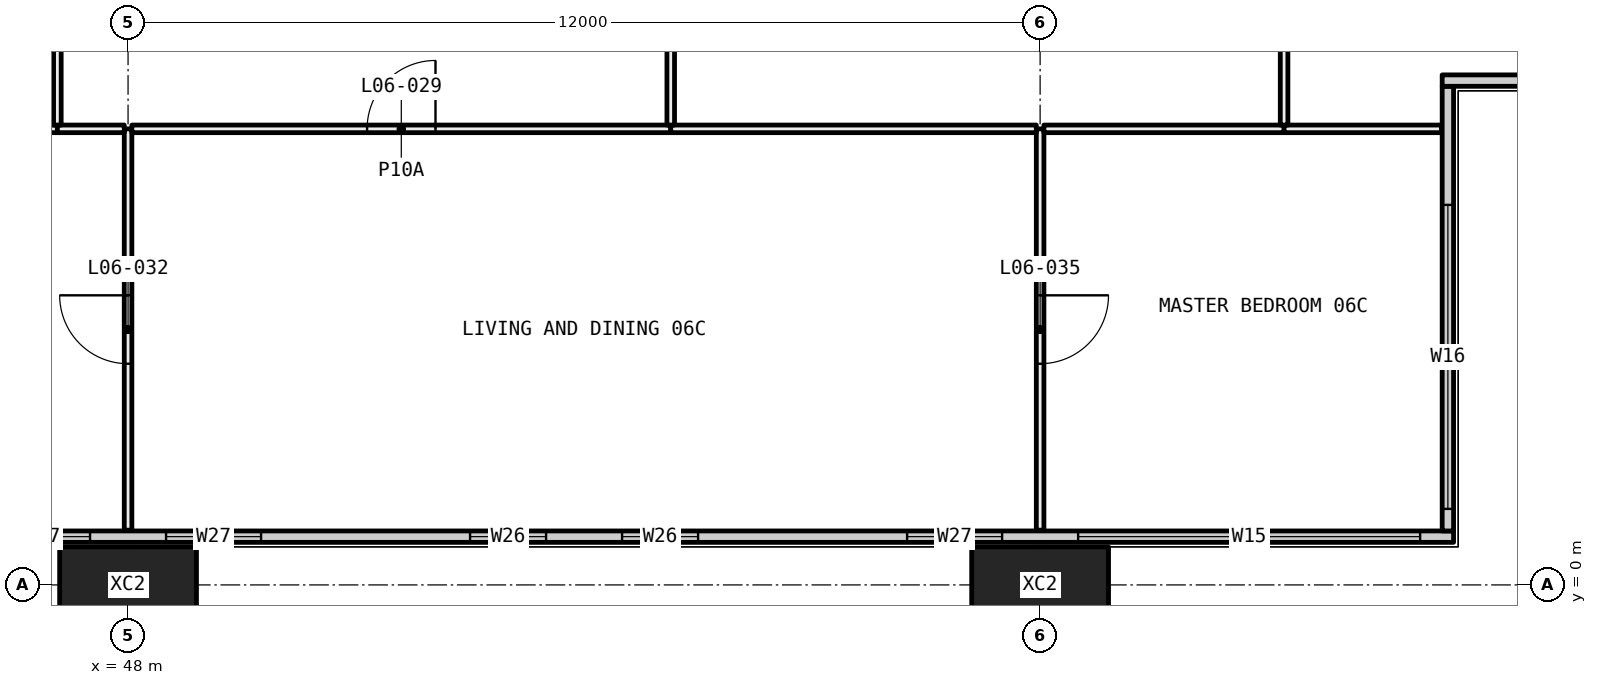
"""IFC4 building model, lengths in metres.
Left out: names, types, materials, properties, quantities, classifications, styles, units other than length and angle.
Written with IfcOpenShell. Run it as: python <this file> out.ifc"""

import sys

from ifc_helpers import new_model, si_unit, direction, frame, frame_2d, origin, origin_2d, place, context, subcontext, project, spatial, rectangle, hollow_rectangle, extrude, element, fill, save


model = new_model("IFC4")
c1 = context("Model", 3, precision=1e-05, world=origin(), true_north=direction((0.0, 1.0)))
c2 = subcontext(c1, "Body", "Model", "MODEL_VIEW")
j1 = project(units=[si_unit("LENGTHUNIT", "METRE"), si_unit("PLANEANGLEUNIT", "RADIAN")], contexts=[c1])
p1 = place(None, origin())
s1 = spatial("IfcSite", under=j1, at=p1, CompositionType="ELEMENT")
p2 = place(p1, origin())
s2 = spatial("IfcBuilding", under=s1, at=p2, CompositionType="ELEMENT")
p3 = place(p2, frame((0.0, 0.0, 33.45)))
s3 = spatial("IfcBuildingStorey", under=s2, at=p3, CompositionType="ELEMENT", Elevation=33.45)
for number, where, z_axis, x_axis in (
    (1, (48.0, 0.0, -0.4), (0.0, 0.0, 1.0), (1.0, 0.0, 0.0)),
    (2, (60.0, 0.0, -0.4), (0.0, 0.0, 1.0), (1.0, 0.0, 0.0)),
):
    element("IfcColumn", number, at=place(p3, frame(where, z_axis=z_axis, x_axis=x_axis)), inside=s3, PredefinedType="COLUMN", context=c2, shape_type="SweptSolid", body=[
        extrude(hollow_rectangle(XDim=1.8, YDim=1.0, WallThickness=0.07, at=origin_2d()), origin(), (0.0, 0.0, 1.0), 3.45),
    ])
p4 = place(p3, frame((6.56, 0.635, 0.0), z_axis=(0.0, 0.0, 1.0), x_axis=(1.0, 0.0, 0.0)))
e3 = element("IfcWall", 3, at=p4, inside=s3, PredefinedType="ELEMENTEDWALL", context=c2, shape_type="SweptSolid", body=[
    extrude(rectangle(XDim=58.88, YDim=0.15, at=frame_2d((29.44, 0.0))), origin(), (0.0, 0.0, 1.0), 3.05),
])
p5 = place(p4, frame((0.44, 0.0, 0.45)))
e4 = element("IfcOpeningElement", 4, at=p5, cuts=e3, PredefinedType="OPENING", context=c2, shape_type="SweptSolid", body=[
    extrude(rectangle(XDim=4.5, YDim=2.55, at=frame_2d((2.25, 1.275))), frame((0.0, 0.085, 0.0), z_axis=(0.0, -1.0, 0.0), x_axis=(1.0, 0.0, 0.0)), (0.0, 0.0, 1.0), 0.17),
])
p6 = place(p4, frame((5.94, 0.0, 0.45)))
e5 = element("IfcOpeningElement", 5, at=p6, cuts=e3, PredefinedType="OPENING", context=c2, shape_type="SweptSolid", body=[
    extrude(rectangle(XDim=1.25, YDim=2.55, at=frame_2d((0.625, 1.275))), frame((0.0, 0.085, 0.0), z_axis=(0.0, -1.0, 0.0), x_axis=(1.0, 0.0, 0.0)), (0.0, 0.0, 1.0), 0.17),
])
p7 = place(p4, frame((9.94, 0.0, 0.45)))
e6 = element("IfcOpeningElement", 6, at=p7, cuts=e3, PredefinedType="OPENING", context=c2, shape_type="SweptSolid", body=[
    extrude(rectangle(XDim=1.0, YDim=2.55, at=frame_2d((0.5, 1.275))), frame((0.0, 0.085, 0.0), z_axis=(0.0, -1.0, 0.0), x_axis=(1.0, 0.0, 0.0)), (0.0, 0.0, 1.0), 0.17),
])
p8 = place(p4, frame((11.94, 0.0, 0.45)))
e7 = element("IfcOpeningElement", 7, at=p8, cuts=e3, PredefinedType="OPENING", context=c2, shape_type="SweptSolid", body=[
    extrude(rectangle(XDim=1.0, YDim=2.55, at=frame_2d((0.5, 1.275))), frame((0.0, 0.085, 0.0), z_axis=(0.0, -1.0, 0.0), x_axis=(1.0, 0.0, 0.0)), (0.0, 0.0, 1.0), 0.17),
])
p9 = place(p4, frame((15.69, 0.0, 0.45)))
e8 = element("IfcOpeningElement", 8, at=p9, cuts=e3, PredefinedType="OPENING", context=c2, shape_type="SweptSolid", body=[
    extrude(rectangle(XDim=1.25, YDim=2.55, at=frame_2d((0.625, 1.275))), frame((0.0, 0.085, 0.0), z_axis=(0.0, -1.0, 0.0), x_axis=(1.0, 0.0, 0.0)), (0.0, 0.0, 1.0), 0.17),
])
p10 = place(p4, frame((17.94, 0.0, 0.45)))
e9 = element("IfcOpeningElement", 9, at=p10, cuts=e3, PredefinedType="OPENING", context=c2, shape_type="SweptSolid", body=[
    extrude(rectangle(XDim=1.25, YDim=2.55, at=frame_2d((0.625, 1.275))), frame((0.0, 0.085, 0.0), z_axis=(0.0, -1.0, 0.0), x_axis=(1.0, 0.0, 0.0)), (0.0, 0.0, 1.0), 0.17),
])
p11 = place(p4, frame((21.94, 0.0, 0.45)))
e10 = element("IfcOpeningElement", 10, at=p11, cuts=e3, PredefinedType="OPENING", context=c2, shape_type="SweptSolid", body=[
    extrude(rectangle(XDim=1.0, YDim=2.55, at=frame_2d((0.5, 1.275))), frame((0.0, 0.085, 0.0), z_axis=(0.0, -1.0, 0.0), x_axis=(1.0, 0.0, 0.0)), (0.0, 0.0, 1.0), 0.17),
])
p12 = place(p4, frame((23.94, 0.0, 0.45)))
e11 = element("IfcOpeningElement", 11, at=p12, cuts=e3, PredefinedType="OPENING", context=c2, shape_type="SweptSolid", body=[
    extrude(rectangle(XDim=1.0, YDim=2.55, at=frame_2d((0.5, 1.275))), frame((0.0, 0.085, 0.0), z_axis=(0.0, -1.0, 0.0), x_axis=(1.0, 0.0, 0.0)), (0.0, 0.0, 1.0), 0.17),
])
p13 = place(p4, frame((27.69, 0.0, 0.45)))
e12 = element("IfcOpeningElement", 12, at=p13, cuts=e3, PredefinedType="OPENING", context=c2, shape_type="SweptSolid", body=[
    extrude(rectangle(XDim=1.25, YDim=2.55, at=frame_2d((0.625, 1.275))), frame((0.0, 0.085, 0.0), z_axis=(0.0, -1.0, 0.0), x_axis=(1.0, 0.0, 0.0)), (0.0, 0.0, 1.0), 0.17),
])
p14 = place(p4, frame((29.94, 0.0, 0.45)))
e13 = element("IfcOpeningElement", 13, at=p14, cuts=e3, PredefinedType="OPENING", context=c2, shape_type="SweptSolid", body=[
    extrude(rectangle(XDim=1.25, YDim=2.55, at=frame_2d((0.625, 1.275))), frame((0.0, 0.085, 0.0), z_axis=(0.0, -1.0, 0.0), x_axis=(1.0, 0.0, 0.0)), (0.0, 0.0, 1.0), 0.17),
])
p15 = place(p4, frame((33.94, 0.0, 0.45)))
e14 = element("IfcOpeningElement", 14, at=p15, cuts=e3, PredefinedType="OPENING", context=c2, shape_type="SweptSolid", body=[
    extrude(rectangle(XDim=1.0, YDim=2.55, at=frame_2d((0.5, 1.275))), frame((0.0, 0.085, 0.0), z_axis=(0.0, -1.0, 0.0), x_axis=(1.0, 0.0, 0.0)), (0.0, 0.0, 1.0), 0.17),
])
p16 = place(p4, frame((35.94, 0.0, 0.45)))
e15 = element("IfcOpeningElement", 15, at=p16, cuts=e3, PredefinedType="OPENING", context=c2, shape_type="SweptSolid", body=[
    extrude(rectangle(XDim=1.0, YDim=2.55, at=frame_2d((0.5, 1.275))), frame((0.0, 0.085, 0.0), z_axis=(0.0, -1.0, 0.0), x_axis=(1.0, 0.0, 0.0)), (0.0, 0.0, 1.0), 0.17),
])
p17 = place(p4, frame((39.69, 0.0, 0.45)))
e16 = element("IfcOpeningElement", 16, at=p17, cuts=e3, PredefinedType="OPENING", context=c2, shape_type="SweptSolid", body=[
    extrude(rectangle(XDim=1.25, YDim=2.55, at=frame_2d((0.625, 1.275))), frame((0.0, 0.085, 0.0), z_axis=(0.0, -1.0, 0.0), x_axis=(1.0, 0.0, 0.0)), (0.0, 0.0, 1.0), 0.17),
])
p18 = place(p4, frame((41.94, 0.0, 0.45)))
e17 = element("IfcOpeningElement", 17, at=p18, cuts=e3, PredefinedType="OPENING", context=c2, shape_type="SweptSolid", body=[
    extrude(rectangle(XDim=1.25, YDim=2.55, at=frame_2d((0.625, 1.275))), frame((0.0, 0.085, 0.0), z_axis=(0.0, -1.0, 0.0), x_axis=(1.0, 0.0, 0.0)), (0.0, 0.0, 1.0), 0.17),
])
p19 = place(p4, frame((45.94, 0.0, 0.45)))
e18 = element("IfcOpeningElement", 18, at=p19, cuts=e3, PredefinedType="OPENING", context=c2, shape_type="SweptSolid", body=[
    extrude(rectangle(XDim=1.0, YDim=2.55, at=frame_2d((0.5, 1.275))), frame((0.0, 0.085, 0.0), z_axis=(0.0, -1.0, 0.0), x_axis=(1.0, 0.0, 0.0)), (0.0, 0.0, 1.0), 0.17),
])
p20 = place(p4, frame((47.94, 0.0, 0.45)))
e19 = element("IfcOpeningElement", 19, at=p20, cuts=e3, PredefinedType="OPENING", context=c2, shape_type="SweptSolid", body=[
    extrude(rectangle(XDim=1.0, YDim=2.55, at=frame_2d((0.5, 1.275))), frame((0.0, 0.085, 0.0), z_axis=(0.0, -1.0, 0.0), x_axis=(1.0, 0.0, 0.0)), (0.0, 0.0, 1.0), 0.17),
])
p21 = place(p4, frame((51.69, 0.0, 0.45)))
e20 = element("IfcOpeningElement", 20, at=p21, cuts=e3, PredefinedType="OPENING", context=c2, shape_type="SweptSolid", body=[
    extrude(rectangle(XDim=1.25, YDim=2.55, at=frame_2d((0.625, 1.275))), frame((0.0, 0.085, 0.0), z_axis=(0.0, -1.0, 0.0), x_axis=(1.0, 0.0, 0.0)), (0.0, 0.0, 1.0), 0.17),
])
p22 = place(p4, frame((53.94, 0.0, 0.45)))
e21 = element("IfcOpeningElement", 21, at=p22, cuts=e3, PredefinedType="OPENING", context=c2, shape_type="SweptSolid", body=[
    extrude(rectangle(XDim=4.5, YDim=2.55, at=frame_2d((2.25, 1.275))), frame((0.0, 0.085, 0.0), z_axis=(0.0, -1.0, 0.0), x_axis=(1.0, 0.0, 0.0)), (0.0, 0.0, 1.0), 0.17),
])
p23 = place(p3, frame((65.365, 0.71, 0.0), z_axis=(0.0, 0.0, 1.0), x_axis=(0.0, 1.0, 0.0)))
e22 = element("IfcWall", 22, at=p23, inside=s3, PredefinedType="ELEMENTEDWALL", context=c2, shape_type="SweptSolid", body=[
    extrude(rectangle(XDim=5.85, YDim=0.15, at=frame_2d((2.925, 0.0))), origin(), (0.0, 0.0, 1.0), 3.05),
])
p24 = place(p23, frame((0.29, 0.0, 0.45)))
e23 = element("IfcOpeningElement", 23, at=p24, cuts=e22, PredefinedType="OPENING", context=c2, shape_type="SweptSolid", body=[
    extrude(rectangle(XDim=4.0, YDim=2.55, at=frame_2d((2.0, 1.275))), frame((0.0, 0.085, 0.0), z_axis=(0.0, -1.0, 0.0), x_axis=(1.0, 0.0, 0.0)), (0.0, 0.0, 1.0), 0.17),
])
p25 = place(p3, frame((65.29, 6.635, 0.0), z_axis=(0.0, 0.0, 1.0), x_axis=(1.0, 0.0, 0.0)))
e24 = element("IfcWall", 24, at=p25, inside=s3, PredefinedType="ELEMENTEDWALL", context=c2, shape_type="SweptSolid", body=[
    extrude(rectangle(XDim=6.15, YDim=0.15, at=frame_2d((3.075, 0.0))), origin(), (0.0, 0.0, 1.0), 3.05),
])
p26 = place(p25, frame((1.71, 0.0, 0.45)))
e25 = element("IfcOpeningElement", 25, at=p26, cuts=e24, PredefinedType="OPENING", context=c2, shape_type="SweptSolid", body=[
    extrude(rectangle(XDim=4.0, YDim=2.55, at=frame_2d((2.0, 1.275))), frame((0.0, 0.085, 0.0), z_axis=(0.0, -1.0, 0.0), x_axis=(1.0, 0.0, 0.0)), (0.0, 0.0, 1.0), 0.17),
])
p27 = place(p3, frame((48.0, 0.72, 0.0), z_axis=(0.0, 0.0, 1.0), x_axis=(0.0, 1.0, 0.0)))
e26 = element("IfcWall", 26, at=p27, inside=s3, PredefinedType="PARTITIONING", context=c2, shape_type="SweptSolid", body=[
    extrude(rectangle(XDim=5.28, YDim=0.1, at=frame_2d((2.64, 0.0))), origin(), (0.0, 0.0, 1.0), 2.45),
])
p28 = place(p27, frame((2.19, 0.0, 0.0)))
e27 = element("IfcOpeningElement", 27, at=p28, cuts=e26, PredefinedType="OPENING", context=c2, shape_type="SweptSolid", body=[
    extrude(rectangle(XDim=0.9, YDim=2.1, at=frame_2d((0.45, 1.05))), frame((0.0, 0.06, 0.0), z_axis=(0.0, -1.0, 0.0), x_axis=(1.0, 0.0, 0.0)), (0.0, 0.0, 1.0), 0.12),
])
p29 = place(p3, frame((47.07, 6.0, 0.0), z_axis=(0.0, 0.0, 1.0), x_axis=(-1.0, 0.0, 0.0)))
e28 = element("IfcWall", 28, at=p29, inside=s3, PredefinedType="PARTITIONING", context=c2, shape_type="SweptSolid", body=[
    extrude(rectangle(XDim=5.02, YDim=0.1, at=frame_2d((2.51, 0.0))), origin(), (0.0, 0.0, 1.0), 3.05),
])
p30 = place(p3, frame((47.95, 6.0, 0.0), z_axis=(0.0, 0.0, 1.0), x_axis=(-1.0, 0.0, 0.0)))
e29 = element("IfcWall", 29, at=p30, inside=s3, PredefinedType="PARTITIONING", context=c2, shape_type="SweptSolid", body=[
    extrude(rectangle(XDim=0.88, YDim=0.1, at=frame_2d((0.44, 0.0))), origin(), (0.0, 0.0, 1.0), 2.45),
])
p31 = place(p3, frame((60.0, 0.72, 0.0), z_axis=(0.0, 0.0, 1.0), x_axis=(0.0, 1.0, 0.0)))
e30 = element("IfcWall", 30, at=p31, inside=s3, PredefinedType="PARTITIONING", context=c2, shape_type="SweptSolid", body=[
    extrude(rectangle(XDim=5.28, YDim=0.1, at=frame_2d((2.64, 0.0))), origin(), (0.0, 0.0, 1.0), 2.45),
])
p32 = place(p31, frame((2.19, 0.0, 0.0)))
e31 = element("IfcOpeningElement", 31, at=p32, cuts=e30, PredefinedType="OPENING", context=c2, shape_type="SweptSolid", body=[
    extrude(rectangle(XDim=0.9, YDim=2.1, at=frame_2d((0.45, 1.05))), frame((0.0, 0.06, 0.0), z_axis=(0.0, -1.0, 0.0), x_axis=(1.0, 0.0, 0.0)), (0.0, 0.0, 1.0), 0.12),
])
p33 = place(p3, frame((55.14, 6.0, 0.0), z_axis=(0.0, 0.0, 1.0), x_axis=(-1.0, 0.0, 0.0)))
e32 = element("IfcWall", 32, at=p33, inside=s3, PredefinedType="PARTITIONING", context=c2, shape_type="SweptSolid", body=[
    extrude(rectangle(XDim=7.09, YDim=0.1, at=frame_2d((3.545, 0.0))), origin(), (0.0, 0.0, 1.0), 2.45),
])
p34 = place(p33, frame((3.095, 0.0, 0.0)))
e33 = element("IfcOpeningElement", 33, at=p34, cuts=e32, PredefinedType="OPENING", context=c2, shape_type="SweptSolid", body=[
    extrude(rectangle(XDim=0.9, YDim=2.1, at=frame_2d((0.45, 1.05))), frame((0.0, 0.06, 0.0), z_axis=(0.0, -1.0, 0.0), x_axis=(1.0, 0.0, 0.0)), (0.0, 0.0, 1.0), 0.12),
])
p35 = place(p3, frame((59.95, 6.0, 0.0), z_axis=(0.0, 0.0, 1.0), x_axis=(-1.0, 0.0, 0.0)))
e34 = element("IfcWall", 34, at=p35, inside=s3, PredefinedType="PARTITIONING", context=c2, shape_type="SweptSolid", body=[
    extrude(rectangle(XDim=4.81, YDim=0.1, at=frame_2d((2.405, 0.0))), origin(), (0.0, 0.0, 1.0), 2.45),
])
p36 = place(p3, frame((63.21, 6.0, 0.0), z_axis=(0.0, 0.0, 1.0), x_axis=(-1.0, 0.0, 0.0)))
e35 = element("IfcWall", 35, at=p36, inside=s3, PredefinedType="PARTITIONING", context=c2, shape_type="SweptSolid", body=[
    extrude(rectangle(XDim=3.16, YDim=0.1, at=frame_2d((1.58, 0.0))), origin(), (0.0, 0.0, 1.0), 2.45),
])
p37 = place(p3, frame((65.28, 6.0, 0.0), z_axis=(0.0, 0.0, 1.0), x_axis=(-1.0, 0.0, 0.0)))
e36 = element("IfcWall", 36, at=p37, inside=s3, PredefinedType="PARTITIONING", context=c2, shape_type="SweptSolid", body=[
    extrude(rectangle(XDim=2.07, YDim=0.1, at=frame_2d((1.035, 0.0))), origin(), (0.0, 0.0, 1.0), 3.05),
])
p38 = place(p3, frame((47.07, 6.05, 0.0), z_axis=(0.0, 0.0, 1.0), x_axis=(0.0, 1.0, 0.0)))
e37 = element("IfcWall", 37, at=p38, inside=s3, PredefinedType="PARTITIONING", context=c2, shape_type="SweptSolid", body=[
    extrude(rectangle(XDim=5.95, YDim=0.1, at=frame_2d((2.975, 0.0))), origin(), (0.0, 0.0, 1.0), 2.45),
])
p39 = place(p38, frame((2.525, 0.0, 0.0)))
e38 = element("IfcOpeningElement", 38, at=p39, cuts=e37, PredefinedType="OPENING", context=c2, shape_type="SweptSolid", body=[
    extrude(rectangle(XDim=0.9, YDim=2.1, at=frame_2d((0.45, 1.05))), frame((0.0, 0.06, 0.0), z_axis=(0.0, -1.0, 0.0), x_axis=(1.0, 0.0, 0.0)), (0.0, 0.0, 1.0), 0.12),
])
p40 = place(p3, frame((55.14, 6.05, 0.0), z_axis=(0.0, 0.0, 1.0), x_axis=(0.0, 1.0, 0.0)))
e39 = element("IfcWall", 39, at=p40, inside=s3, PredefinedType="PARTITIONING", context=c2, shape_type="SweptSolid", body=[
    extrude(rectangle(XDim=5.95, YDim=0.1, at=frame_2d((2.975, 0.0))), origin(), (0.0, 0.0, 1.0), 2.45),
])
p41 = place(p40, frame((2.525, 0.0, 0.0)))
e40 = element("IfcOpeningElement", 40, at=p41, cuts=e39, PredefinedType="OPENING", context=c2, shape_type="SweptSolid", body=[
    extrude(rectangle(XDim=0.9, YDim=2.1, at=frame_2d((0.45, 1.05))), frame((0.0, 0.06, 0.0), z_axis=(0.0, -1.0, 0.0), x_axis=(1.0, 0.0, 0.0)), (0.0, 0.0, 1.0), 0.12),
])
p42 = place(p3, frame((63.21, 6.05, 0.0), z_axis=(0.0, 0.0, 1.0), x_axis=(0.0, 1.0, 0.0)))
e41 = element("IfcWall", 41, at=p42, inside=s3, PredefinedType="PARTITIONING", context=c2, shape_type="SweptSolid", body=[
    extrude(rectangle(XDim=5.875, YDim=0.1, at=frame_2d((2.938, 0.0))), origin(), (0.0, 0.0, 1.0), 2.45),
])
p43 = place(p42, frame((2.488, 0.0, 0.0)))
e42 = element("IfcOpeningElement", 42, at=p43, cuts=e41, PredefinedType="OPENING", context=c2, shape_type="SweptSolid", body=[
    extrude(rectangle(XDim=0.9, YDim=2.1, at=frame_2d((0.45, 1.05))), frame((0.0, 0.06, 0.0), z_axis=(0.0, -1.0, 0.0), x_axis=(1.0, 0.0, 0.0)), (0.0, 0.0, 1.0), 0.12),
])
p44 = place(p17, origin())
e43 = element("IfcWindow", 43, at=p44, inside=s3, PartitioningType="SINGLE_PANEL", PredefinedType="WINDOW", context=c2, shape_type="SweptSolid", body=[
    extrude(rectangle(XDim=1.25, YDim=2.55, at=frame_2d((0.625, 1.275))), frame((0.0, 0.03, 0.0), z_axis=(0.0, -1.0, 0.0), x_axis=(1.0, 0.0, 0.0)), (0.0, 0.0, 1.0), 0.06),
])
fill(e16, e43)
p45 = place(p18, origin())
e44 = element("IfcWindow", 44, at=p45, inside=s3, PartitioningType="SINGLE_PANEL", PredefinedType="WINDOW", context=c2, shape_type="SweptSolid", body=[
    extrude(rectangle(XDim=1.25, YDim=2.55, at=frame_2d((0.625, 1.275))), frame((0.0, 0.03, 0.0), z_axis=(0.0, -1.0, 0.0), x_axis=(1.0, 0.0, 0.0)), (0.0, 0.0, 1.0), 0.06),
])
fill(e17, e44)
p46 = place(p19, origin())
e45 = element("IfcWindow", 45, at=p46, inside=s3, PartitioningType="SINGLE_PANEL", PredefinedType="WINDOW", context=c2, shape_type="SweptSolid", body=[
    extrude(rectangle(XDim=1.0, YDim=2.55, at=frame_2d((0.5, 1.275))), frame((0.0, 0.03, 0.0), z_axis=(0.0, -1.0, 0.0), x_axis=(1.0, 0.0, 0.0)), (0.0, 0.0, 1.0), 0.06),
])
fill(e18, e45)
p47 = place(p20, origin())
e46 = element("IfcWindow", 46, at=p47, inside=s3, PartitioningType="SINGLE_PANEL", PredefinedType="WINDOW", context=c2, shape_type="SweptSolid", body=[
    extrude(rectangle(XDim=1.0, YDim=2.55, at=frame_2d((0.5, 1.275))), frame((0.0, 0.03, 0.0), z_axis=(0.0, -1.0, 0.0), x_axis=(1.0, 0.0, 0.0)), (0.0, 0.0, 1.0), 0.06),
])
fill(e19, e46)
p48 = place(p21, origin())
e47 = element("IfcWindow", 47, at=p48, inside=s3, PartitioningType="SINGLE_PANEL", PredefinedType="WINDOW", context=c2, shape_type="SweptSolid", body=[
    extrude(rectangle(XDim=1.25, YDim=2.55, at=frame_2d((0.625, 1.275))), frame((0.0, 0.03, 0.0), z_axis=(0.0, -1.0, 0.0), x_axis=(1.0, 0.0, 0.0)), (0.0, 0.0, 1.0), 0.06),
])
fill(e20, e47)
p49 = place(p22, origin())
e48 = element("IfcWindow", 48, at=p49, inside=s3, PartitioningType="SINGLE_PANEL", PredefinedType="WINDOW", context=c2, shape_type="SweptSolid", body=[
    extrude(rectangle(XDim=4.5, YDim=2.55, at=frame_2d((2.25, 1.275))), frame((0.0, 0.03, 0.0), z_axis=(0.0, -1.0, 0.0), x_axis=(1.0, 0.0, 0.0)), (0.0, 0.0, 1.0), 0.06),
])
fill(e21, e48)
p50 = place(p24, origin())
e49 = element("IfcWindow", 49, at=p50, inside=s3, PartitioningType="SINGLE_PANEL", PredefinedType="WINDOW", context=c2, shape_type="SweptSolid", body=[
    extrude(rectangle(XDim=4.0, YDim=2.55, at=frame_2d((2.0, 1.275))), frame((0.0, 0.03, 0.0), z_axis=(0.0, -1.0, 0.0), x_axis=(1.0, 0.0, 0.0)), (0.0, 0.0, 1.0), 0.06),
])
fill(e23, e49)
p51 = place(p34, frame((0.9, 0.0, 0.0), x_axis=(-1.0, 0.0, 0.0)))
e50 = element("IfcDoor", 50, at=p51, inside=s3, OperationType="SINGLE_SWING_LEFT", PredefinedType="DOOR", context=c2, shape_type="SweptSolid", body=[
    extrude(rectangle(XDim=0.9, YDim=2.1, at=frame_2d((0.45, 1.05))), frame((0.0, 0.025, 0.0), z_axis=(0.0, -1.0, 0.0), x_axis=(1.0, 0.0, 0.0)), (0.0, 0.0, 1.0), 0.05),
])
fill(e33, e50)
p52 = place(p28, origin())
e51 = element("IfcDoor", 51, at=p52, inside=s3, OperationType="SINGLE_SWING_LEFT", PredefinedType="DOOR", context=c2, shape_type="SweptSolid", body=[
    extrude(rectangle(XDim=0.9, YDim=2.1, at=frame_2d((0.45, 1.05))), frame((0.0, 0.025, 0.0), z_axis=(0.0, -1.0, 0.0), x_axis=(1.0, 0.0, 0.0)), (0.0, 0.0, 1.0), 0.05),
])
fill(e27, e51)
p53 = place(p32, frame((0.9, 0.0, 0.0), x_axis=(-1.0, 0.0, 0.0)))
e52 = element("IfcDoor", 52, at=p53, inside=s3, OperationType="SINGLE_SWING_RIGHT", PredefinedType="DOOR", context=c2, shape_type="SweptSolid", body=[
    extrude(rectangle(XDim=0.9, YDim=2.1, at=frame_2d((0.45, 1.05))), frame((0.0, 0.025, 0.0), z_axis=(0.0, -1.0, 0.0), x_axis=(1.0, 0.0, 0.0)), (0.0, 0.0, 1.0), 0.05),
])
fill(e31, e52)
save(model, sys.argv[1])
